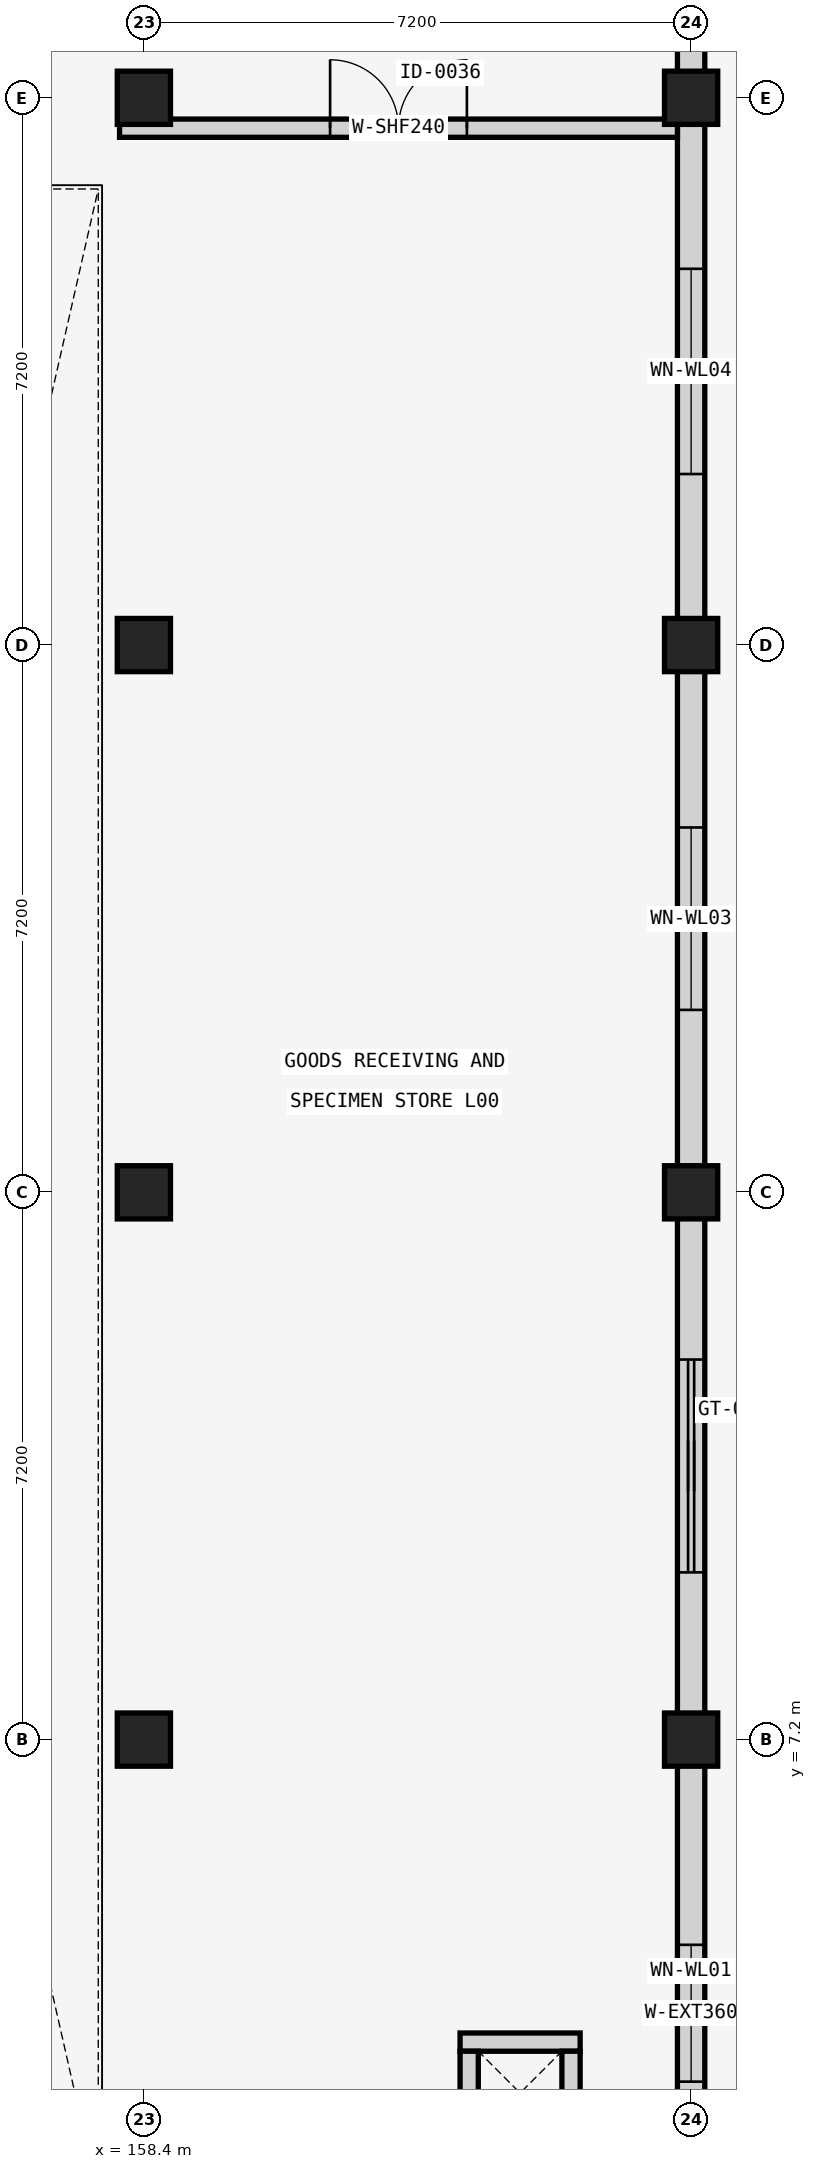
"""IFC4 building model, lengths in metres.
Left out: names, types, materials, properties, quantities, classifications, styles, units other than length and angle.
Written with IfcOpenShell. Run it as: python <this file> out.ifc"""

import sys

from ifc_helpers import new_model, si_unit, direction, frame, frame_2d, origin, origin_2d, place, context, subcontext, project, spatial, rectangle, extrude, element, fill, save


model = new_model("IFC4")
c1 = context("Model", 3, precision=1e-05, world=origin(), true_north=direction((0.0, 1.0)))
c2 = subcontext(c1, "Body", "Model", "MODEL_VIEW")
j1 = project(units=[si_unit("LENGTHUNIT", "METRE"), si_unit("PLANEANGLEUNIT", "RADIAN")], contexts=[c1])
p1 = place(None, origin())
s1 = spatial("IfcSite", under=j1, at=p1, CompositionType="ELEMENT")
p2 = place(p1, origin())
s2 = spatial("IfcBuilding", under=s1, at=p2, CompositionType="ELEMENT")
p3 = place(p2, origin())
s3 = spatial("IfcBuildingStorey", under=s2, at=p3, CompositionType="ELEMENT", Elevation=0.0)
for number, where, z_axis, x_axis in (
    (1, (158.4, 7.2, 0.0), (0.0, 0.0, 1.0), (1.0, 0.0, 0.0)),
    (2, (158.4, 14.4, 0.0), (0.0, 0.0, 1.0), (1.0, 0.0, 0.0)),
    (3, (158.4, 21.6, 0.0), (0.0, 0.0, 1.0), (1.0, 0.0, 0.0)),
    (4, (158.4, 28.8, 0.0), (0.0, 0.0, 1.0), (1.0, 0.0, 0.0)),
    (5, (165.6, 7.2, 0.0), (0.0, 0.0, 1.0), (1.0, 0.0, 0.0)),
    (6, (165.6, 14.4, 0.0), (0.0, 0.0, 1.0), (1.0, 0.0, 0.0)),
    (7, (165.6, 21.6, 0.0), (0.0, 0.0, 1.0), (1.0, 0.0, 0.0)),
    (8, (165.6, 28.8, 0.0), (0.0, 0.0, 1.0), (1.0, 0.0, 0.0)),
):
    element("IfcColumn", number, at=place(p3, frame(where, z_axis=z_axis, x_axis=x_axis)), inside=s3, PredefinedType="COLUMN", context=c2, shape_type="SweptSolid", body=[
        extrude(rectangle(XDim=0.7, YDim=0.7, at=origin_2d()), origin(), (0.0, 0.0, 1.0), 4.8),
    ])
p4 = place(p3, frame((165.6, 0.34, 0.0), z_axis=(0.0, 0.0, 1.0), x_axis=(0.0, 1.0, 0.0)))
e9 = element("IfcWall", 9, at=p4, inside=s3, PredefinedType="SOLIDWALL", context=c2, shape_type="SweptSolid", body=[
    extrude(rectangle(XDim=6.52, YDim=0.36, at=frame_2d((3.26, 0.0))), origin(), (0.0, 0.0, 1.0), 4.45),
])
p5 = place(p4, frame((2.36, 0.0, 0.95)))
e10 = element("IfcOpeningElement", 10, at=p5, cuts=e9, PredefinedType="OPENING", context=c2, shape_type="SweptSolid", body=[
    extrude(rectangle(XDim=1.8, YDim=2.1, at=frame_2d((0.9, 1.05))), frame((0.0, 0.19, 0.0), z_axis=(0.0, -1.0, 0.0), x_axis=(1.0, 0.0, 0.0)), (0.0, 0.0, 1.0), 0.38),
])
p6 = place(p3, frame((165.6, 7.54, 0.0), z_axis=(0.0, 0.0, 1.0), x_axis=(0.0, 1.0, 0.0)))
e11 = element("IfcWall", 11, at=p6, inside=s3, PredefinedType="SOLIDWALL", context=c2, shape_type="SweptSolid", body=[
    extrude(rectangle(XDim=6.52, YDim=0.36, at=frame_2d((3.26, 0.0))), origin(), (0.0, 0.0, 1.0), 4.45),
])
p7 = place(p6, frame((1.86, 0.0, 0.0)))
e12 = element("IfcOpeningElement", 12, at=p7, cuts=e11, PredefinedType="OPENING", context=c2, shape_type="SweptSolid", body=[
    extrude(rectangle(XDim=2.8, YDim=2.8, at=frame_2d((1.4, 1.4))), frame((0.0, 0.19, 0.0), z_axis=(0.0, -1.0, 0.0), x_axis=(1.0, 0.0, 0.0)), (0.0, 0.0, 1.0), 0.38),
])
p8 = place(p3, frame((165.6, 14.74, 0.0), z_axis=(0.0, 0.0, 1.0), x_axis=(0.0, 1.0, 0.0)))
e13 = element("IfcWall", 13, at=p8, inside=s3, PredefinedType="SOLIDWALL", context=c2, shape_type="SweptSolid", body=[
    extrude(rectangle(XDim=6.52, YDim=0.36, at=frame_2d((3.26, 0.0))), origin(), (0.0, 0.0, 1.0), 4.45),
])
p9 = place(p8, frame((2.06, 0.0, 0.95)))
e14 = element("IfcOpeningElement", 14, at=p9, cuts=e13, PredefinedType="OPENING", context=c2, shape_type="SweptSolid", body=[
    extrude(rectangle(XDim=2.4, YDim=2.1, at=frame_2d((1.2, 1.05))), frame((0.0, 0.19, 0.0), z_axis=(0.0, -1.0, 0.0), x_axis=(1.0, 0.0, 0.0)), (0.0, 0.0, 1.0), 0.38),
])
p10 = place(p3, frame((165.6, 21.94, 0.0), z_axis=(0.0, 0.0, 1.0), x_axis=(0.0, 1.0, 0.0)))
e15 = element("IfcWall", 15, at=p10, inside=s3, PredefinedType="SOLIDWALL", context=c2, shape_type="SweptSolid", body=[
    extrude(rectangle(XDim=6.52, YDim=0.36, at=frame_2d((3.26, 0.0))), origin(), (0.0, 0.0, 1.0), 4.45),
])
p11 = place(p10, frame((1.91, 0.0, 0.95)))
e16 = element("IfcOpeningElement", 16, at=p11, cuts=e15, PredefinedType="OPENING", context=c2, shape_type="SweptSolid", body=[
    extrude(rectangle(XDim=2.7, YDim=2.1, at=frame_2d((1.35, 1.05))), frame((0.0, 0.19, 0.0), z_axis=(0.0, -1.0, 0.0), x_axis=(1.0, 0.0, 0.0)), (0.0, 0.0, 1.0), 0.38),
])
p12 = place(p3, frame((165.6, 29.14, 0.0), z_axis=(0.0, 0.0, 1.0), x_axis=(0.0, 1.0, 0.0)))
e17 = element("IfcWall", 17, at=p12, inside=s3, PredefinedType="SOLIDWALL", context=c2, shape_type="SweptSolid", body=[
    extrude(rectangle(XDim=6.52, YDim=0.36, at=frame_2d((3.26, 0.0))), origin(), (0.0, 0.0, 1.0), 4.45),
])
p13 = place(p12, frame((1.76, 0.0, 0.95)))
e18 = element("IfcOpeningElement", 18, at=p13, cuts=e17, PredefinedType="OPENING", context=c2, shape_type="SweptSolid", body=[
    extrude(rectangle(XDim=3.0, YDim=2.1, at=frame_2d((1.5, 1.05))), frame((0.0, 0.19, 0.0), z_axis=(0.0, -1.0, 0.0), x_axis=(1.0, 0.0, 0.0)), (0.0, 0.0, 1.0), 0.38),
])
p14 = place(p3, frame((158.08, 28.4, 0.0), z_axis=(0.0, 0.0, 1.0), x_axis=(1.0, 0.0, 0.0)))
e19 = element("IfcWall", 19, at=p14, inside=s3, PredefinedType="SOLIDWALL", context=c2, shape_type="SweptSolid", body=[
    extrude(rectangle(XDim=7.34, YDim=0.24, at=frame_2d((3.67, 0.0))), origin(), (0.0, 0.0, 1.0), 4.45),
])
p15 = place(p14, frame((2.77, 0.0, 0.0)))
e20 = element("IfcOpeningElement", 20, at=p15, cuts=e19, PredefinedType="OPENING", context=c2, shape_type="SweptSolid", body=[
    extrude(rectangle(XDim=1.8, YDim=2.35, at=frame_2d((0.9, 1.175))), frame((0.0, 0.13, 0.0), z_axis=(0.0, -1.0, 0.0), x_axis=(1.0, 0.0, 0.0)), (0.0, 0.0, 1.0), 0.26),
])
p16 = place(p3, frame((162.56, 3.22, 0.0), z_axis=(0.0, 0.0, 1.0), x_axis=(1.0, 0.0, 0.0)))
e21 = element("IfcWall", 21, at=p16, inside=s3, PredefinedType="SOLIDWALL", context=c2, shape_type="SweptSolid", body=[
    extrude(rectangle(XDim=1.58, YDim=0.24, at=frame_2d((0.79, 0.0))), origin(), (0.0, 0.0, 1.0), 4.45),
])
for number, where, z_axis, x_axis in (
    (22, (162.68, 2.0, 0.0), (0.0, 0.0, 1.0), (0.0, 1.0, 0.0)),
    (23, (164.02, 2.0, 0.0), (0.0, 0.0, 1.0), (0.0, 1.0, 0.0)),
):
    element("IfcWall", number, at=place(p3, frame(where, z_axis=z_axis, x_axis=x_axis)), inside=s3, PredefinedType="SOLIDWALL", context=c2, shape_type="SweptSolid", body=[
        extrude(rectangle(XDim=1.1, YDim=0.24, at=frame_2d((0.55, 0.0))), origin(), (0.0, 0.0, 1.0), 4.45),
    ])
p17 = place(p5, origin())
e24 = element("IfcWindow", 24, at=p17, inside=s3, PartitioningType="SINGLE_PANEL", PredefinedType="WINDOW", context=c2, shape_type="SweptSolid", body=[
    extrude(rectangle(XDim=1.8, YDim=2.1, at=frame_2d((0.9, 1.05))), frame((0.0, 0.03, 0.0), z_axis=(0.0, -1.0, 0.0), x_axis=(1.0, 0.0, 0.0)), (0.0, 0.0, 1.0), 0.06),
])
fill(e10, e24)
p18 = place(p7, frame((2.8, 0.0, 0.0), z_axis=(0.0, 0.0, 1.0), x_axis=(-1.0, 0.0, 0.0)))
e25 = element("IfcDoor", 25, at=p18, inside=s3, OperationType="ROLLINGUP", PredefinedType="GATE", context=c2, shape_type="SweptSolid", body=[
    extrude(rectangle(XDim=2.8, YDim=2.8, at=frame_2d((1.4, 1.4))), frame((0.0, 0.025, 0.0), z_axis=(0.0, -1.0, 0.0), x_axis=(1.0, 0.0, 0.0)), (0.0, 0.0, 1.0), 0.05),
])
fill(e12, e25)
p19 = place(p9, origin())
e26 = element("IfcWindow", 26, at=p19, inside=s3, PartitioningType="SINGLE_PANEL", PredefinedType="WINDOW", context=c2, shape_type="SweptSolid", body=[
    extrude(rectangle(XDim=2.4, YDim=2.1, at=frame_2d((1.2, 1.05))), frame((0.0, 0.03, 0.0), z_axis=(0.0, -1.0, 0.0), x_axis=(1.0, 0.0, 0.0)), (0.0, 0.0, 1.0), 0.06),
])
fill(e14, e26)
p20 = place(p11, origin())
e27 = element("IfcWindow", 27, at=p20, inside=s3, PartitioningType="SINGLE_PANEL", PredefinedType="WINDOW", context=c2, shape_type="SweptSolid", body=[
    extrude(rectangle(XDim=2.7, YDim=2.1, at=frame_2d((1.35, 1.05))), frame((0.0, 0.03, 0.0), z_axis=(0.0, -1.0, 0.0), x_axis=(1.0, 0.0, 0.0)), (0.0, 0.0, 1.0), 0.06),
])
fill(e16, e27)
p21 = place(p15, origin())
e28 = element("IfcDoor", 28, at=p21, inside=s3, OperationType="DOUBLE_DOOR_SINGLE_SWING", PredefinedType="DOOR", context=c2, shape_type="SweptSolid", body=[
    extrude(rectangle(XDim=1.8, YDim=2.35, at=frame_2d((0.9, 1.175))), frame((0.0, 0.025, 0.0), z_axis=(0.0, -1.0, 0.0), x_axis=(1.0, 0.0, 0.0)), (0.0, 0.0, 1.0), 0.05),
])
fill(e20, e28)
save(model, sys.argv[1])
